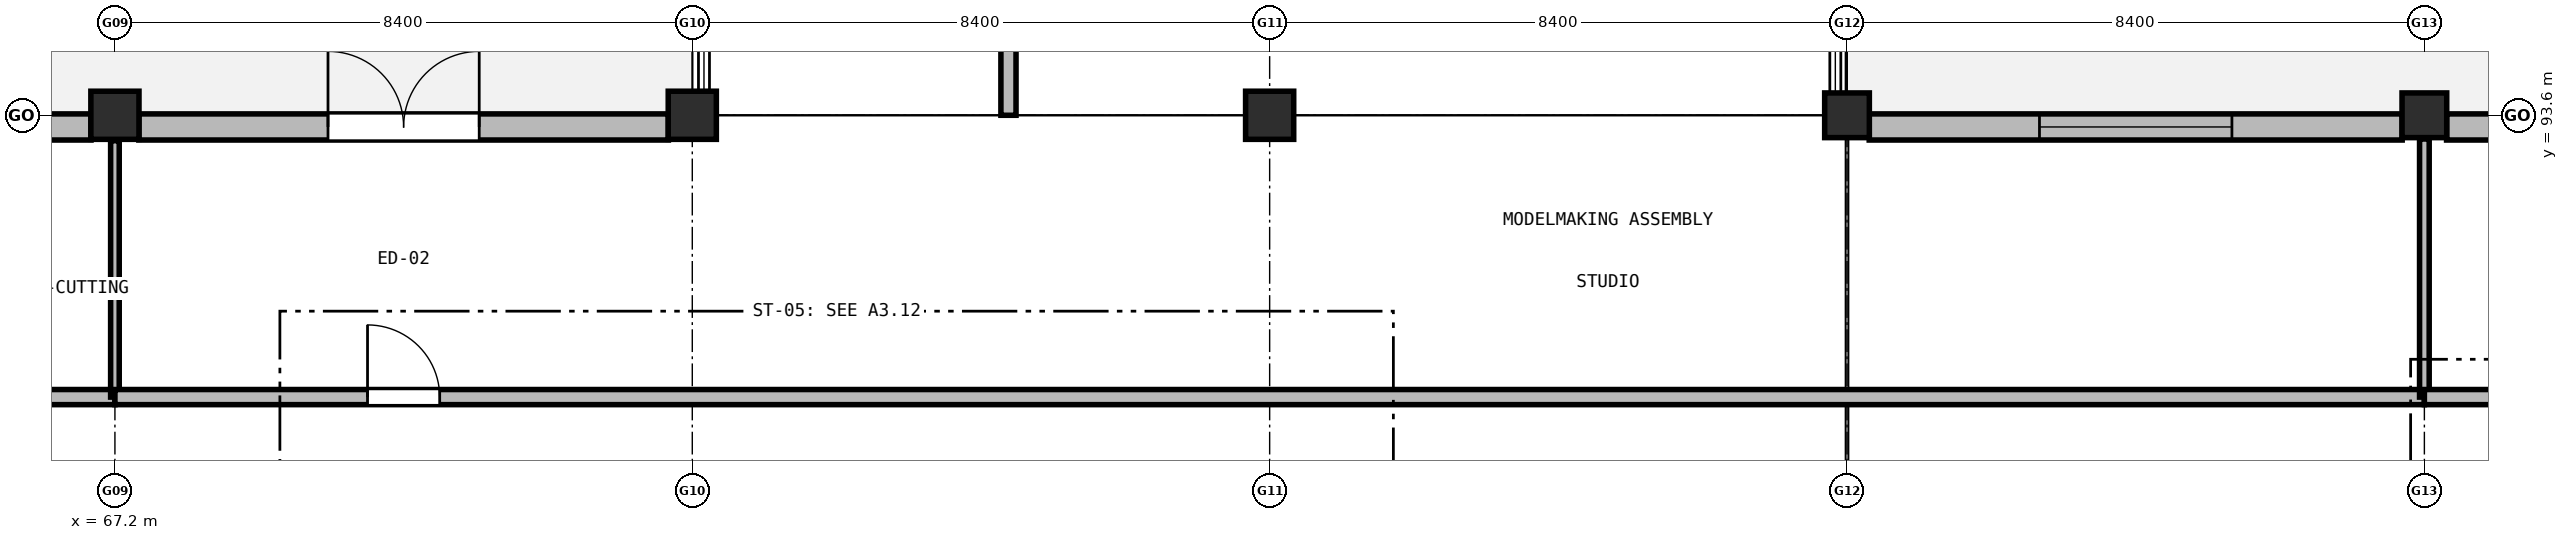
"""IFC4 building model, lengths in metres.
Left out: names, types, materials, properties, quantities, classifications, styles, units other than length and angle.
Written with IfcOpenShell. Run it as: python <this file> out.ifc"""

import sys

from ifc_helpers import new_model, si_unit, direction, frame, frame_2d, origin, origin_2d, place, context, subcontext, project, spatial, rectangle, extrude, element, fill, save


model = new_model("IFC4")
c1 = context("Model", 3, precision=1e-05, world=origin(), true_north=direction((0.0, 1.0)))
c2 = subcontext(c1, "Body", "Model", "MODEL_VIEW")
j1 = project(units=[si_unit("LENGTHUNIT", "METRE"), si_unit("PLANEANGLEUNIT", "RADIAN")], contexts=[c1])
p1 = place(None, origin())
s1 = spatial("IfcSite", under=j1, at=p1, CompositionType="ELEMENT")
p2 = place(p1, origin())
s2 = spatial("IfcBuilding", under=s1, at=p2, CompositionType="ELEMENT")
p3 = place(p2, origin())
s3 = spatial("IfcBuildingStorey", under=s2, at=p3, CompositionType="ELEMENT", Elevation=0.0)
for number, where, z_axis, x_axis in (
    (1, (67.2, 93.6, 0.0), (0.0, 0.0, 1.0), (1.0, 0.0, 0.0)),
    (2, (75.6, 93.6, 0.0), (0.0, 0.0, 1.0), (1.0, 0.0, 0.0)),
    (3, (84.0, 93.6, 0.0), (0.0, 0.0, 1.0), (1.0, 0.0, 0.0)),
):
    element("IfcColumn", number, at=place(p3, frame(where, z_axis=z_axis, x_axis=x_axis)), inside=s3, PredefinedType="COLUMN", context=c2, shape_type="SweptSolid", body=[
        extrude(rectangle(XDim=0.7, YDim=0.7, at=origin_2d()), origin(), (0.0, 0.0, 1.0), 5.1),
    ])
for number, where, z_axis, x_axis in (
    (4, (92.4, 93.6, 0.0), (0.0, 0.0, 1.0), (1.0, 0.0, 0.0)),
    (5, (100.8, 93.6, 0.0), (0.0, 0.0, 1.0), (1.0, 0.0, 0.0)),
):
    element("IfcColumn", number, at=place(p3, frame(where, z_axis=z_axis, x_axis=x_axis)), inside=s3, PredefinedType="COLUMN", context=c2, shape_type="SweptSolid", body=[
        extrude(rectangle(XDim=0.65, YDim=0.65, at=origin_2d()), origin(), (0.0, 0.0, 1.0), 5.1),
    ])
p4 = place(p3, frame((59.148, 93.43, 0.0), z_axis=(0.0, 0.0, 1.0), x_axis=(1.0, 0.0, 0.0)))
e6 = element("IfcWall", 6, at=p4, inside=s3, PredefinedType="SOLIDWALL", context=c2, shape_type="SweptSolid", body=[
    extrude(rectangle(XDim=7.704, YDim=0.38, at=frame_2d((3.852, 0.0))), origin(), (0.0, 0.0, 1.0), 4.01),
])
p5 = place(p4, frame((2.252, 0.0, 0.95)))
e7 = element("IfcOpeningElement", 7, at=p5, cuts=e6, PredefinedType="OPENING", context=c2, shape_type="SweptSolid", body=[
    extrude(rectangle(XDim=3.2, YDim=2.2, at=frame_2d((1.6, 1.1))), frame((0.0, 0.2, 0.0), z_axis=(0.0, -1.0, 0.0), x_axis=(1.0, 0.0, 0.0)), (0.0, 0.0, 1.0), 0.4),
])
p6 = place(p3, frame((67.548, 93.43, 0.0), z_axis=(0.0, 0.0, 1.0), x_axis=(1.0, 0.0, 0.0)))
e8 = element("IfcWall", 8, at=p6, inside=s3, PredefinedType="SOLIDWALL", context=c2, shape_type="SweptSolid", body=[
    extrude(rectangle(XDim=7.704, YDim=0.38, at=frame_2d((3.852, 0.0))), origin(), (0.0, 0.0, 1.0), 4.01),
])
p7 = place(p6, frame((2.752, 0.0, 0.0)))
e9 = element("IfcOpeningElement", 9, at=p7, cuts=e8, PredefinedType="OPENING", context=c2, shape_type="SweptSolid", body=[
    extrude(rectangle(XDim=2.2, YDim=2.4, at=frame_2d((1.1, 1.2))), frame((0.0, 0.2, 0.0), z_axis=(0.0, -1.0, 0.0), x_axis=(1.0, 0.0, 0.0)), (0.0, 0.0, 1.0), 0.4),
])
p8 = place(p3, frame((92.723, 93.43, 0.0), z_axis=(0.0, 0.0, 1.0), x_axis=(1.0, 0.0, 0.0)))
e10 = element("IfcWall", 10, at=p8, inside=s3, PredefinedType="SOLIDWALL", context=c2, shape_type="SweptSolid", body=[
    extrude(rectangle(XDim=7.754, YDim=0.38, at=frame_2d((3.877, 0.0))), origin(), (0.0, 0.0, 1.0), 4.01),
])
p9 = place(p8, frame((2.477, 0.0, 0.95)))
e11 = element("IfcOpeningElement", 11, at=p9, cuts=e10, PredefinedType="OPENING", context=c2, shape_type="SweptSolid", body=[
    extrude(rectangle(XDim=2.8, YDim=2.0, at=frame_2d((1.4, 1.0))), frame((0.0, 0.2, 0.0), z_axis=(0.0, -1.0, 0.0), x_axis=(1.0, 0.0, 0.0)), (0.0, 0.0, 1.0), 0.4),
])
p10 = place(p3, frame((101.123, 93.43, 0.0), z_axis=(0.0, 0.0, 1.0), x_axis=(1.0, 0.0, 0.0)))
e12 = element("IfcWall", 12, at=p10, inside=s3, PredefinedType="SOLIDWALL", context=c2, shape_type="SweptSolid", body=[
    extrude(rectangle(XDim=7.754, YDim=0.38, at=frame_2d((3.877, 0.0))), origin(), (0.0, 0.0, 1.0), 4.01),
])
p11 = place(p10, frame((0.851, 0.0, 0.95)))
e13 = element("IfcOpeningElement", 13, at=p11, cuts=e12, PredefinedType="OPENING", context=c2, shape_type="SweptSolid", body=[
    extrude(rectangle(XDim=2.6, YDim=1.8, at=frame_2d((1.3, 0.9))), frame((0.0, 0.2, 0.0), z_axis=(0.0, -1.0, 0.0), x_axis=(1.0, 0.0, 0.0)), (0.0, 0.0, 1.0), 0.4),
])
p12 = place(p10, frame((4.302, 0.0, 0.95)))
e14 = element("IfcOpeningElement", 14, at=p12, cuts=e12, PredefinedType="OPENING", context=c2, shape_type="SweptSolid", body=[
    extrude(rectangle(XDim=2.6, YDim=1.8, at=frame_2d((1.3, 0.9))), frame((0.0, 0.2, 0.0), z_axis=(0.0, -1.0, 0.0), x_axis=(1.0, 0.0, 0.0)), (0.0, 0.0, 1.0), 0.4),
])
p13 = place(p3, frame((33.6, 89.5, 0.0), z_axis=(0.0, 0.0, 1.0), x_axis=(1.0, 0.0, 0.0)))
e15 = element("IfcWall", 15, at=p13, inside=s3, PredefinedType="SOLIDWALL", context=c2, shape_type="SweptSolid", body=[
    extrude(rectangle(XDim=33.6, YDim=0.22, at=frame_2d((16.8, 0.0))), origin(), (0.0, 0.0, 1.0), 4.105),
])
p14 = place(p13, frame((3.55, 0.0, 0.0)))
e16 = element("IfcOpeningElement", 16, at=p14, cuts=e15, PredefinedType="OPENING", context=c2, shape_type="SweptSolid", body=[
    extrude(rectangle(XDim=1.3, YDim=2.15, at=frame_2d((0.65, 1.075))), frame((0.0, 0.12, 0.0), z_axis=(0.0, -1.0, 0.0), x_axis=(1.0, 0.0, 0.0)), (0.0, 0.0, 1.0), 0.24),
])
p15 = place(p3, frame((67.2, 89.5, 0.0), z_axis=(0.0, 0.0, 1.0), x_axis=(0.0, 1.0, 0.0)))
e17 = element("IfcWall", 17, at=p15, inside=s3, PredefinedType="PARTITIONING", context=c2, shape_type="SweptSolid", body=[
    extrude(rectangle(XDim=3.73, YDim=0.125, at=frame_2d((1.865, 0.0))), origin(), (0.0, 0.0, 1.0), 4.005),
])
p16 = place(p3, frame((67.2, 89.5, 0.0), z_axis=(0.0, 0.0, 1.0), x_axis=(1.0, 0.0, 0.0)))
e18 = element("IfcWall", 18, at=p16, inside=s3, PredefinedType="SOLIDWALL", context=c2, shape_type="SweptSolid", body=[
    extrude(rectangle(XDim=33.6, YDim=0.22, at=frame_2d((16.8, 0.0))), origin(), (0.0, 0.0, 1.0), 4.105),
])
p17 = place(p16, frame((3.675, 0.0, 0.0)))
e19 = element("IfcOpeningElement", 19, at=p17, cuts=e18, PredefinedType="OPENING", context=c2, shape_type="SweptSolid", body=[
    extrude(rectangle(XDim=1.05, YDim=2.15, at=frame_2d((0.525, 1.075))), frame((0.0, 0.12, 0.0), z_axis=(0.0, -1.0, 0.0), x_axis=(1.0, 0.0, 0.0)), (0.0, 0.0, 1.0), 0.24),
])
p18 = place(p3, frame((100.8, 89.5, 0.0), z_axis=(0.0, 0.0, 1.0), x_axis=(0.0, 1.0, 0.0)))
e20 = element("IfcWall", 20, at=p18, inside=s3, PredefinedType="PARTITIONING", context=c2, shape_type="SweptSolid", body=[
    extrude(rectangle(XDim=3.755, YDim=0.14, at=frame_2d((1.877, 0.0))), origin(), (0.0, 0.0, 1.0), 4.005),
])
p19 = place(p3, frame((100.8, 89.5, 0.0), z_axis=(0.0, 0.0, 1.0), x_axis=(1.0, 0.0, 0.0)))
e21 = element("IfcWall", 21, at=p19, inside=s3, PredefinedType="SOLIDWALL", context=c2, shape_type="SweptSolid", body=[
    extrude(rectangle(XDim=33.6, YDim=0.22, at=frame_2d((16.8, 0.0))), origin(), (0.0, 0.0, 1.0), 4.105),
])
p20 = place(p19, frame((3.7, 0.0, 0.0)))
e22 = element("IfcOpeningElement", 22, at=p20, cuts=e21, PredefinedType="OPENING", context=c2, shape_type="SweptSolid", body=[
    extrude(rectangle(XDim=1.0, YDim=2.1, at=frame_2d((0.5, 1.05))), frame((0.0, 0.12, 0.0), z_axis=(0.0, -1.0, 0.0), x_axis=(1.0, 0.0, 0.0)), (0.0, 0.0, 1.0), 0.24),
])
p21 = place(p3, frame((80.2, 93.6, 0.0), z_axis=(0.0, 0.0, 1.0), x_axis=(0.0, 1.0, 0.0)))
e23 = element("IfcWall", 23, at=p21, inside=s3, PredefinedType="SOLIDWALL", context=c2, shape_type="SweptSolid", body=[
    extrude(rectangle(XDim=21.6, YDim=0.22, at=frame_2d((10.8, 0.0))), origin(), (0.0, 0.0, 1.0), 4.005),
])
p22 = place(p21, frame((10.025, 0.0, 0.0)))
e24 = element("IfcOpeningElement", 24, at=p22, cuts=e23, PredefinedType="OPENING", context=c2, shape_type="SweptSolid", body=[
    extrude(rectangle(XDim=1.55, YDim=2.2, at=frame_2d((0.775, 1.1))), frame((0.0, 0.12, 0.0), z_axis=(0.0, -1.0, 0.0), x_axis=(1.0, 0.0, 0.0)), (0.0, 0.0, 1.0), 0.24),
])
p23 = place(p7, origin())
e25 = element("IfcDoor", 25, at=p23, inside=s3, OperationType="DOUBLE_DOOR_SINGLE_SWING", PredefinedType="DOOR", context=c2, shape_type="SweptSolid", body=[
    extrude(rectangle(XDim=2.2, YDim=2.4, at=frame_2d((1.1, 1.2))), frame((0.0, 0.025, 0.0), z_axis=(0.0, -1.0, 0.0), x_axis=(1.0, 0.0, 0.0)), (0.0, 0.0, 1.0), 0.05),
])
fill(e9, e25)
p24 = place(p9, origin())
e26 = element("IfcWindow", 26, at=p24, inside=s3, PartitioningType="SINGLE_PANEL", PredefinedType="WINDOW", context=c2, shape_type="SweptSolid", body=[
    extrude(rectangle(XDim=2.8, YDim=2.0, at=frame_2d((1.4, 1.0))), frame((0.0, 0.03, 0.0), z_axis=(0.0, -1.0, 0.0), x_axis=(1.0, 0.0, 0.0)), (0.0, 0.0, 1.0), 0.06),
])
fill(e11, e26)
p25 = place(p17, origin())
e27 = element("IfcDoor", 27, at=p25, inside=s3, OperationType="SINGLE_SWING_LEFT", PredefinedType="DOOR", context=c2, shape_type="SweptSolid", body=[
    extrude(rectangle(XDim=1.05, YDim=2.15, at=frame_2d((0.525, 1.075))), frame((0.0, 0.025, 0.0), z_axis=(0.0, -1.0, 0.0), x_axis=(1.0, 0.0, 0.0)), (0.0, 0.0, 1.0), 0.05),
])
fill(e19, e27)
save(model, sys.argv[1])
